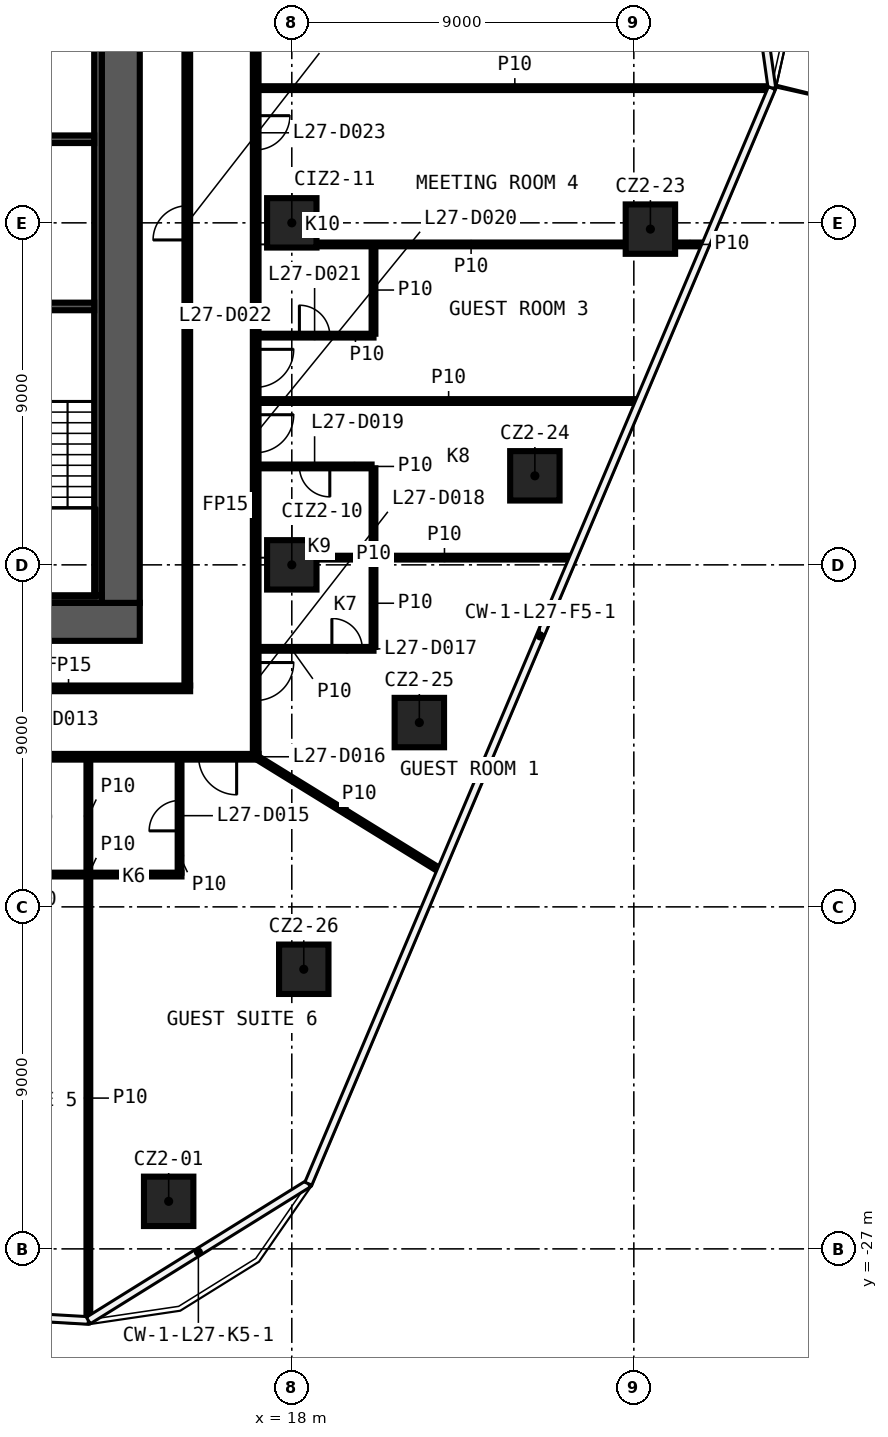
"""IFC4 building model, lengths in metres.
Left out: names, types, materials, properties, quantities, classifications, styles, units other than length and angle.
Written with IfcOpenShell. Run it as: python <this file> out.ifc"""

import sys

from ifc_helpers import new_model, si_unit, direction, frame, frame_2d, origin, origin_2d, place, context, subcontext, project, spatial, rectangle, extrude, element, fill, save


model = new_model("IFC4")
c1 = context("Model", 3, precision=1e-05, world=origin(), true_north=direction((0.0, 1.0)))
c2 = subcontext(c1, "Body", "Model", "MODEL_VIEW")
j1 = project(units=[si_unit("LENGTHUNIT", "METRE"), si_unit("PLANEANGLEUNIT", "RADIAN")], contexts=[c1])
p1 = place(None, origin())
s1 = spatial("IfcSite", under=j1, at=p1, CompositionType="ELEMENT")
p2 = place(p1, origin())
s2 = spatial("IfcBuilding", under=s1, at=p2, CompositionType="ELEMENT")
p3 = place(p2, frame((0.0, 0.0, 124.8)))
s3 = spatial("IfcBuildingStorey", under=s2, at=p3, CompositionType="ELEMENT", Elevation=124.8)
for number, where, z_axis, x_axis in (
    (1, (14.76, -25.749, 0.0), (0.0, 0.0, 1.0), (1.0, 0.0, 0.0)),
    (2, (27.436, -0.165, 0.0), (0.0, 0.0, 1.0), (1.0, 0.0, 0.0)),
    (3, (24.396, -6.657, 0.0), (0.0, 0.0, 1.0), (1.0, 0.0, 0.0)),
    (4, (21.356, -13.15, 0.0), (0.0, 0.0, 1.0), (1.0, 0.0, 0.0)),
    (5, (18.315, -19.642, 0.0), (0.0, 0.0, 1.0), (1.0, 0.0, 0.0)),
    (6, (18.0, -9.0, 0.0), (0.0, 0.0, 1.0), (1.0, 0.0, 0.0)),
    (7, (18.0, 0.0, 0.0), (0.0, 0.0, 1.0), (1.0, 0.0, 0.0)),
):
    element("IfcColumn", number, at=place(p3, frame(where, z_axis=z_axis, x_axis=x_axis)), inside=s3, PredefinedType="COLUMN", context=c2, shape_type="SweptSolid", body=[
        extrude(rectangle(XDim=1.3, YDim=1.3, at=origin_2d()), origin(), (0.0, 0.0, 1.0), 3.3),
    ])
p4 = place(p3, frame((10.197, -17.15, 0.0), z_axis=(0.0, 0.0, 1.0), x_axis=(1.0, 0.0, 0.0)))
e8 = element("IfcWall", 8, at=p4, inside=s3, PredefinedType="PARTITIONING", context=c2, shape_type="SweptSolid", body=[
    extrude(rectangle(XDim=4.9, YDim=0.1, at=frame_2d((2.45, 0.0))), origin(), (0.0, 0.0, 1.0), 3.3),
])
p5 = place(p3, frame((17.125, -14.05, 0.0), z_axis=(0.0, 0.0, 1.0), x_axis=(-1.0, 0.0, 0.0)))
e9 = element("IfcWall", 9, at=p5, inside=s3, PredefinedType="PARTITIONING", context=c2, shape_type="SweptSolid", body=[
    extrude(rectangle(XDim=34.25, YDim=0.15, at=frame_2d((17.125, 0.0))), origin(), (0.0, 0.0, 1.0), 3.3),
])
p6 = place(p5, frame((32.089, 0.0, 0.0)))
e10 = element("IfcOpeningElement", 10, at=p6, cuts=e9, PredefinedType="OPENING", context=c2, shape_type="SweptSolid", body=[
    extrude(rectangle(XDim=0.9, YDim=2.1, at=frame_2d((0.45, 1.05))), frame((0.0, 0.085, 0.0), z_axis=(0.0, -1.0, 0.0), x_axis=(1.0, 0.0, 0.0)), (0.0, 0.0, 1.0), 0.17),
])
p7 = place(p5, frame((25.666, 0.0, 0.0)))
e11 = element("IfcOpeningElement", 11, at=p7, cuts=e9, PredefinedType="OPENING", context=c2, shape_type="SweptSolid", body=[
    extrude(rectangle(XDim=1.0, YDim=2.1, at=frame_2d((0.5, 1.05))), frame((0.0, 0.085, 0.0), z_axis=(0.0, -1.0, 0.0), x_axis=(1.0, 0.0, 0.0)), (0.0, 0.0, 1.0), 0.17),
])
p8 = place(p5, frame((18.714, 0.0, 0.0)))
e12 = element("IfcOpeningElement", 12, at=p8, cuts=e9, PredefinedType="OPENING", context=c2, shape_type="SweptSolid", body=[
    extrude(rectangle(XDim=1.0, YDim=2.1, at=frame_2d((0.5, 1.05))), frame((0.0, 0.085, 0.0), z_axis=(0.0, -1.0, 0.0), x_axis=(1.0, 0.0, 0.0)), (0.0, 0.0, 1.0), 0.17),
])
p9 = place(p5, frame((16.558, 0.0, 0.0)))
e13 = element("IfcOpeningElement", 13, at=p9, cuts=e9, PredefinedType="OPENING", context=c2, shape_type="SweptSolid", body=[
    extrude(rectangle(XDim=1.0, YDim=2.1, at=frame_2d((0.5, 1.05))), frame((0.0, 0.085, 0.0), z_axis=(0.0, -1.0, 0.0), x_axis=(1.0, 0.0, 0.0)), (0.0, 0.0, 1.0), 0.17),
])
p10 = place(p5, frame((9.602, 0.0, 0.0)))
e14 = element("IfcOpeningElement", 14, at=p10, cuts=e9, PredefinedType="OPENING", context=c2, shape_type="SweptSolid", body=[
    extrude(rectangle(XDim=1.0, YDim=2.1, at=frame_2d((0.5, 1.05))), frame((0.0, 0.085, 0.0), z_axis=(0.0, -1.0, 0.0), x_axis=(1.0, 0.0, 0.0)), (0.0, 0.0, 1.0), 0.17),
])
p11 = place(p5, frame((7.451, 0.0, 0.0)))
e15 = element("IfcOpeningElement", 15, at=p11, cuts=e9, PredefinedType="OPENING", context=c2, shape_type="SweptSolid", body=[
    extrude(rectangle(XDim=1.0, YDim=2.1, at=frame_2d((0.5, 1.05))), frame((0.0, 0.085, 0.0), z_axis=(0.0, -1.0, 0.0), x_axis=(1.0, 0.0, 0.0)), (0.0, 0.0, 1.0), 0.17),
])
p12 = place(p5, frame((0.576, 0.0, 0.0)))
e16 = element("IfcOpeningElement", 16, at=p12, cuts=e9, PredefinedType="OPENING", context=c2, shape_type="SweptSolid", body=[
    extrude(rectangle(XDim=1.0, YDim=2.1, at=frame_2d((0.5, 1.05))), frame((0.0, 0.085, 0.0), z_axis=(0.0, -1.0, 0.0), x_axis=(1.0, 0.0, 0.0)), (0.0, 0.0, 1.0), 0.17),
])
p13 = place(p3, frame((8.925, -12.25, 0.0), z_axis=(0.0, 0.0, 1.0), x_axis=(1.0, 0.0, 0.0)))
e17 = element("IfcWall", 17, at=p13, inside=s3, PredefinedType="PARTITIONING", context=c2, shape_type="SweptSolid", body=[
    extrude(rectangle(XDim=6.4, YDim=0.15, at=frame_2d((3.2, 0.0))), origin(), (0.0, 0.0, 1.0), 3.3),
])
p14 = place(p3, frame((17.125, -11.21, 0.0), z_axis=(0.0, 0.0, 1.0), x_axis=(1.0, 0.0, 0.0)))
e18 = element("IfcWall", 18, at=p14, inside=s3, PredefinedType="PARTITIONING", context=c2, shape_type="SweptSolid", body=[
    extrude(rectangle(XDim=3.025, YDim=0.1, at=frame_2d((1.512, 0.0))), origin(), (0.0, 0.0, 1.0), 3.3),
])
p15 = place(p14, frame((1.93, 0.0, 0.0)))
e19 = element("IfcOpeningElement", 19, at=p15, cuts=e18, PredefinedType="OPENING", context=c2, shape_type="SweptSolid", body=[
    extrude(rectangle(XDim=0.8, YDim=2.1, at=frame_2d((0.4, 1.05))), frame((0.0, 0.06, 0.0), z_axis=(0.0, -1.0, 0.0), x_axis=(1.0, 0.0, 0.0)), (0.0, 0.0, 1.0), 0.12),
])
p16 = place(p3, frame((18.65, -8.81, 0.0), z_axis=(0.0, 0.0, 1.0), x_axis=(1.0, 0.0, 0.0)))
e20 = element("IfcWall", 20, at=p16, inside=s3, PredefinedType="PARTITIONING", context=c2, shape_type="SweptSolid", body=[
    extrude(rectangle(XDim=6.735, YDim=0.1, at=frame_2d((3.367, 0.0))), origin(), (0.0, 0.0, 1.0), 3.3),
])
p17 = place(p3, frame((20.1, -6.41, 0.0), z_axis=(0.0, 0.0, 1.0), x_axis=(-1.0, 0.0, 0.0)))
e21 = element("IfcWall", 21, at=p17, inside=s3, PredefinedType="PARTITIONING", context=c2, shape_type="SweptSolid", body=[
    extrude(rectangle(XDim=2.975, YDim=0.1, at=frame_2d((1.488, 0.0))), origin(), (0.0, 0.0, 1.0), 3.3),
])
p18 = place(p17, frame((1.1, 0.0, 0.0)))
e22 = element("IfcOpeningElement", 22, at=p18, cuts=e21, PredefinedType="OPENING", context=c2, shape_type="SweptSolid", body=[
    extrude(rectangle(XDim=0.8, YDim=2.1, at=frame_2d((0.4, 1.05))), frame((0.0, 0.06, 0.0), z_axis=(0.0, -1.0, 0.0), x_axis=(1.0, 0.0, 0.0)), (0.0, 0.0, 1.0), 0.12),
])
p19 = place(p3, frame((17.125, -4.689, 0.0), z_axis=(0.0, 0.0, 1.0), x_axis=(1.0, 0.0, 0.0)))
e23 = element("IfcWall", 23, at=p19, inside=s3, PredefinedType="PARTITIONING", context=c2, shape_type="SweptSolid", body=[
    extrude(rectangle(XDim=10.003, YDim=0.1, at=frame_2d((5.001, 0.0))), origin(), (0.0, 0.0, 1.0), 3.3),
])
p20 = place(p3, frame((17.125, -2.968, 0.0), z_axis=(0.0, 0.0, 1.0), x_axis=(1.0, 0.0, 0.0)))
e24 = element("IfcWall", 24, at=p20, inside=s3, PredefinedType="PARTITIONING", context=c2, shape_type="SweptSolid", body=[
    extrude(rectangle(XDim=3.025, YDim=0.1, at=frame_2d((1.512, 0.0))), origin(), (0.0, 0.0, 1.0), 3.3),
])
p21 = place(p20, frame((1.075, 0.0, 0.0)))
e25 = element("IfcOpeningElement", 25, at=p21, cuts=e24, PredefinedType="OPENING", context=c2, shape_type="SweptSolid", body=[
    extrude(rectangle(XDim=0.8, YDim=2.1, at=frame_2d((0.4, 1.05))), frame((0.0, 0.06, 0.0), z_axis=(0.0, -1.0, 0.0), x_axis=(1.0, 0.0, 0.0)), (0.0, 0.0, 1.0), 0.12),
])
p22 = place(p3, frame((18.65, -0.568, 0.0), z_axis=(0.0, 0.0, 1.0), x_axis=(1.0, 0.0, 0.0)))
e26 = element("IfcWall", 26, at=p22, inside=s3, PredefinedType="PARTITIONING", context=c2, shape_type="SweptSolid", body=[
    extrude(rectangle(XDim=8.136, YDim=0.1, at=frame_2d((4.068, 0.0))), origin(), (0.0, 0.0, 1.0), 3.3),
])
p23 = place(p3, frame((28.086, -0.568, 0.0), z_axis=(0.0, 0.0, 1.0), x_axis=(1.0, 0.0, 0.0)))
e27 = element("IfcWall", 27, at=p23, inside=s3, PredefinedType="PARTITIONING", context=c2, shape_type="SweptSolid", body=[
    extrude(rectangle(XDim=0.786, YDim=0.1, at=frame_2d((0.393, 0.0))), origin(), (0.0, 0.0, 1.0), 3.3),
])
p24 = place(p3, frame((17.125, 3.545, 0.0), z_axis=(0.0, 0.0, 1.0), x_axis=(1.0, 0.0, 0.0)))
e28 = element("IfcWall", 28, at=p24, inside=s3, PredefinedType="PARTITIONING", context=c2, shape_type="SweptSolid", body=[
    extrude(rectangle(XDim=13.487, YDim=0.1, at=frame_2d((6.743, 0.0))), origin(), (0.0, 0.0, 1.0), 3.3),
])
p25 = place(p3, frame((20.15, -11.16, 0.0), z_axis=(0.0, 0.0, 1.0), x_axis=(0.0, 1.0, 0.0)))
e29 = element("IfcWall", 29, at=p25, inside=s3, PredefinedType="PARTITIONING", context=c2, shape_type="SweptSolid", body=[
    extrude(rectangle(XDim=2.3, YDim=0.1, at=frame_2d((1.15, 0.0))), origin(), (0.0, 0.0, 1.0), 3.3),
])
p26 = place(p3, frame((20.15, -8.76, 0.0), z_axis=(0.0, 0.0, 1.0), x_axis=(0.0, 1.0, 0.0)))
e30 = element("IfcWall", 30, at=p26, inside=s3, PredefinedType="PARTITIONING", context=c2, shape_type="SweptSolid", body=[
    extrude(rectangle(XDim=2.3, YDim=0.1, at=frame_2d((1.15, 0.0))), origin(), (0.0, 0.0, 1.0), 3.3),
])
p27 = place(p3, frame((20.15, -2.918, 0.0), z_axis=(0.0, 0.0, 1.0), x_axis=(0.0, 1.0, 0.0)))
e31 = element("IfcWall", 31, at=p27, inside=s3, PredefinedType="PARTITIONING", context=c2, shape_type="SweptSolid", body=[
    extrude(rectangle(XDim=2.3, YDim=0.1, at=frame_2d((1.15, 0.0))), origin(), (0.0, 0.0, 1.0), 3.3),
])
p28 = place(p3, frame((17.05, 13.975, 0.0), z_axis=(0.0, 0.0, 1.0), x_axis=(0.0, -1.0, 0.0)))
e32 = element("IfcWall", 32, at=p28, inside=s3, PredefinedType="PARTITIONING", context=c2, shape_type="SweptSolid", body=[
    extrude(rectangle(XDim=27.95, YDim=0.15, at=frame_2d((13.975, 0.0))), origin(), (0.0, 0.0, 1.0), 3.3),
])
p29 = place(p28, frame((25.545, 0.0, 0.0)))
e33 = element("IfcOpeningElement", 33, at=p29, cuts=e32, PredefinedType="OPENING", context=c2, shape_type="SweptSolid", body=[
    extrude(rectangle(XDim=1.0, YDim=2.1, at=frame_2d((0.5, 1.05))), frame((0.0, 0.085, 0.0), z_axis=(0.0, -1.0, 0.0), x_axis=(1.0, 0.0, 0.0)), (0.0, 0.0, 1.0), 0.17),
])
p30 = place(p28, frame((19.024, 0.0, 0.0)))
e34 = element("IfcOpeningElement", 34, at=p30, cuts=e32, PredefinedType="OPENING", context=c2, shape_type="SweptSolid", body=[
    extrude(rectangle(XDim=1.0, YDim=2.1, at=frame_2d((0.5, 1.05))), frame((0.0, 0.085, 0.0), z_axis=(0.0, -1.0, 0.0), x_axis=(1.0, 0.0, 0.0)), (0.0, 0.0, 1.0), 0.17),
])
p31 = place(p28, frame((17.303, 0.0, 0.0)))
e35 = element("IfcOpeningElement", 35, at=p31, cuts=e32, PredefinedType="OPENING", context=c2, shape_type="SweptSolid", body=[
    extrude(rectangle(XDim=1.0, YDim=2.1, at=frame_2d((0.5, 1.05))), frame((0.0, 0.085, 0.0), z_axis=(0.0, -1.0, 0.0), x_axis=(1.0, 0.0, 0.0)), (0.0, 0.0, 1.0), 0.17),
])
p32 = place(p28, frame((11.155, 0.0, 0.0)))
e36 = element("IfcOpeningElement", 36, at=p32, cuts=e32, PredefinedType="OPENING", context=c2, shape_type="SweptSolid", body=[
    extrude(rectangle(XDim=0.9, YDim=2.1, at=frame_2d((0.45, 1.05))), frame((0.0, 0.085, 0.0), z_axis=(0.0, -1.0, 0.0), x_axis=(1.0, 0.0, 0.0)), (0.0, 0.0, 1.0), 0.17),
])
p33 = place(p28, frame((7.145, 0.0, 0.0)))
e37 = element("IfcOpeningElement", 37, at=p33, cuts=e32, PredefinedType="OPENING", context=c2, shape_type="SweptSolid", body=[
    extrude(rectangle(XDim=0.9, YDim=2.1, at=frame_2d((0.45, 1.05))), frame((0.0, 0.085, 0.0), z_axis=(0.0, -1.0, 0.0), x_axis=(1.0, 0.0, 0.0)), (0.0, 0.0, 1.0), 0.17),
])
p34 = place(p28, frame((2.168, 0.0, 0.0)))
e38 = element("IfcOpeningElement", 38, at=p34, cuts=e32, PredefinedType="OPENING", context=c2, shape_type="SweptSolid", body=[
    extrude(rectangle(XDim=0.9, YDim=2.1, at=frame_2d((0.45, 1.05))), frame((0.0, 0.085, 0.0), z_axis=(0.0, -1.0, 0.0), x_axis=(1.0, 0.0, 0.0)), (0.0, 0.0, 1.0), 0.17),
])
p35 = place(p3, frame((15.25, -12.175, 0.0), z_axis=(0.0, 0.0, 1.0), x_axis=(0.0, 1.0, 0.0)))
e39 = element("IfcWall", 39, at=p35, inside=s3, PredefinedType="PARTITIONING", context=c2, shape_type="SweptSolid", body=[
    extrude(rectangle(XDim=24.35, YDim=0.15, at=frame_2d((12.175, 0.0))), origin(), (0.0, 0.0, 1.0), 3.3),
])
p36 = place(p35, frame((11.725, 0.0, 0.0)))
e40 = element("IfcOpeningElement", 40, at=p36, cuts=e39, PredefinedType="OPENING", context=c2, shape_type="SweptSolid", body=[
    extrude(rectangle(XDim=0.9, YDim=2.1, at=frame_2d((0.45, 1.05))), frame((0.0, 0.085, 0.0), z_axis=(0.0, -1.0, 0.0), x_axis=(1.0, 0.0, 0.0)), (0.0, 0.0, 1.0), 0.17),
])
p37 = place(p3, frame((15.047, -17.1, 0.0), z_axis=(0.0, 0.0, 1.0), x_axis=(0.0, 1.0, 0.0)))
e41 = element("IfcWall", 41, at=p37, inside=s3, PredefinedType="PARTITIONING", context=c2, shape_type="SweptSolid", body=[
    extrude(rectangle(XDim=2.975, YDim=0.1, at=frame_2d((1.488, 0.0))), origin(), (0.0, 0.0, 1.0), 3.3),
])
p38 = place(p37, frame((1.1, 0.0, 0.0)))
e42 = element("IfcOpeningElement", 42, at=p38, cuts=e41, PredefinedType="OPENING", context=c2, shape_type="SweptSolid", body=[
    extrude(rectangle(XDim=0.8, YDim=2.1, at=frame_2d((0.4, 1.05))), frame((0.0, 0.06, 0.0), z_axis=(0.0, -1.0, 0.0), x_axis=(1.0, 0.0, 0.0)), (0.0, 0.0, 1.0), 0.12),
])
p39 = place(p3, frame((12.647, -28.864, 0.0), z_axis=(0.0, 0.0, 1.0), x_axis=(0.0, 1.0, 0.0)))
e43 = element("IfcWall", 43, at=p39, inside=s3, PredefinedType="PARTITIONING", context=c2, shape_type="SweptSolid", body=[
    extrude(rectangle(XDim=11.664, YDim=0.1, at=frame_2d((5.832, 0.0))), origin(), (0.0, 0.0, 1.0), 3.3),
])
p40 = place(p3, frame((12.647, -17.1, 0.0), z_axis=(0.0, 0.0, 1.0), x_axis=(0.0, 1.0, 0.0)))
e44 = element("IfcWall", 44, at=p40, inside=s3, PredefinedType="PARTITIONING", context=c2, shape_type="SweptSolid", body=[
    extrude(rectangle(XDim=2.975, YDim=0.1, at=frame_2d((1.488, 0.0))), origin(), (0.0, 0.0, 1.0), 3.3),
])
p41 = place(p3, frame((17.05, -14.05, 0.0), z_axis=(0.0, 0.0, 1.0), x_axis=(0.851278656023, -0.524713874221, 0.0)))
e45 = element("IfcWall", 45, at=p41, inside=s3, PredefinedType="PARTITIONING", context=c2, shape_type="SweptSolid", body=[
    extrude(rectangle(XDim=5.7, YDim=0.1, at=frame_2d((2.85, 0.0))), origin(), (0.0, 0.0, 1.0), 3.3),
])
p42 = place(p3, frame((14.0, -10.5, 0.0), z_axis=(0.0, 0.0, 1.0), x_axis=(-1.0, 0.0, 0.0)))
e46 = element("IfcWall", 46, at=p42, inside=s3, PredefinedType="SHEAR", context=c2, shape_type="SweptSolid", body=[
    extrude(rectangle(XDim=28.0, YDim=1.0, at=frame_2d((14.0, 0.0))), origin(), (0.0, 0.0, 1.0), 3.3),
])
p43 = place(p42, frame((5.1, 0.0, 0.0)))
e47 = element("IfcOpeningElement", 47, at=p43, cuts=e46, PredefinedType="OPENING", context=c2, shape_type="SweptSolid", body=[
    extrude(rectangle(XDim=1.6, YDim=2.1, at=frame_2d((0.8, 1.05))), frame((0.0, 0.51, 0.0), z_axis=(0.0, -1.0, 0.0), x_axis=(1.0, 0.0, 0.0)), (0.0, 0.0, 1.0), 1.02),
])
p44 = place(p3, frame((13.5, 10.0, 0.0), z_axis=(0.0, 0.0, 1.0), x_axis=(0.0, -1.0, 0.0)))
e48 = element("IfcWall", 48, at=p44, inside=s3, PredefinedType="SHEAR", context=c2, shape_type="SweptSolid", body=[
    extrude(rectangle(XDim=20.0, YDim=1.0, at=frame_2d((10.0, 0.0))), origin(), (0.0, 0.0, 1.0), 3.3),
])
p45 = place(p3, frame((13.0, -9.9, 0.0), z_axis=(0.0, 0.0, 1.0), x_axis=(-1.0, 0.0, 0.0)))
e49 = element("IfcWall", 49, at=p45, inside=s3, PredefinedType="SHEAR", context=c2, shape_type="SweptSolid", body=[
    extrude(rectangle(XDim=3.7, YDim=0.2, at=frame_2d((1.85, 0.0))), origin(), (0.0, 0.0, 1.0), 3.3),
])
p46 = place(p3, frame((12.9, 9.8, 0.0), z_axis=(0.0, 0.0, 1.0), x_axis=(0.0, -1.0, 0.0)))
e50 = element("IfcWall", 50, at=p46, inside=s3, PredefinedType="SHEAR", context=c2, shape_type="SweptSolid", body=[
    extrude(rectangle(XDim=19.6, YDim=0.2, at=frame_2d((9.8, 0.0))), origin(), (0.0, 0.0, 1.0), 3.3),
])
for number, where, z_axis, x_axis in (
    (51, (9.45, 2.2, 0.0), (0.0, 0.0, 1.0), (1.0, 0.0, 0.0)),
    (52, (9.45, -2.2, 0.0), (0.0, 0.0, 1.0), (1.0, 0.0, 0.0)),
):
    element("IfcWall", number, at=place(p3, frame(where, z_axis=z_axis, x_axis=x_axis)), inside=s3, PredefinedType="SHEAR", context=c2, shape_type="SweptSolid", body=[
        extrude(rectangle(XDim=3.35, YDim=0.2, at=frame_2d((1.675, 0.0))), origin(), (0.0, 0.0, 1.0), 3.3),
    ])
p47 = place(p38, origin())
e53 = element("IfcDoor", 53, at=p47, inside=s3, OperationType="SINGLE_SWING_LEFT", PredefinedType="DOOR", context=c2, shape_type="SweptSolid", body=[
    extrude(rectangle(XDim=0.8, YDim=2.1, at=frame_2d((0.4, 1.05))), frame((0.0, 0.025, 0.0), z_axis=(0.0, -1.0, 0.0), x_axis=(1.0, 0.0, 0.0)), (0.0, 0.0, 1.0), 0.05),
])
fill(e42, e53)
p48 = place(p12, origin())
e54 = element("IfcDoor", 54, at=p48, inside=s3, OperationType="SINGLE_SWING_RIGHT", PredefinedType="DOOR", context=c2, shape_type="SweptSolid", body=[
    extrude(rectangle(XDim=1.0, YDim=2.1, at=frame_2d((0.5, 1.05))), frame((0.0, 0.025, 0.0), z_axis=(0.0, -1.0, 0.0), x_axis=(1.0, 0.0, 0.0)), (0.0, 0.0, 1.0), 0.05),
])
fill(e16, e54)
p49 = place(p15, origin())
e55 = element("IfcDoor", 55, at=p49, inside=s3, OperationType="SINGLE_SWING_RIGHT", PredefinedType="DOOR", context=c2, shape_type="SweptSolid", body=[
    extrude(rectangle(XDim=0.8, YDim=2.1, at=frame_2d((0.4, 1.05))), frame((0.0, 0.025, 0.0), z_axis=(0.0, -1.0, 0.0), x_axis=(1.0, 0.0, 0.0)), (0.0, 0.0, 1.0), 0.05),
])
fill(e19, e55)
p50 = place(p29, origin())
e56 = element("IfcDoor", 56, at=p50, inside=s3, OperationType="SINGLE_SWING_LEFT", PredefinedType="DOOR", context=c2, shape_type="SweptSolid", body=[
    extrude(rectangle(XDim=1.0, YDim=2.1, at=frame_2d((0.5, 1.05))), frame((0.0, 0.025, 0.0), z_axis=(0.0, -1.0, 0.0), x_axis=(1.0, 0.0, 0.0)), (0.0, 0.0, 1.0), 0.05),
])
fill(e33, e56)
p51 = place(p18, origin())
e57 = element("IfcDoor", 57, at=p51, inside=s3, OperationType="SINGLE_SWING_LEFT", PredefinedType="DOOR", context=c2, shape_type="SweptSolid", body=[
    extrude(rectangle(XDim=0.8, YDim=2.1, at=frame_2d((0.4, 1.05))), frame((0.0, 0.025, 0.0), z_axis=(0.0, -1.0, 0.0), x_axis=(1.0, 0.0, 0.0)), (0.0, 0.0, 1.0), 0.05),
])
fill(e22, e57)
p52 = place(p30, origin())
e58 = element("IfcDoor", 58, at=p52, inside=s3, OperationType="SINGLE_SWING_RIGHT", PredefinedType="DOOR", context=c2, shape_type="SweptSolid", body=[
    extrude(rectangle(XDim=1.0, YDim=2.1, at=frame_2d((0.5, 1.05))), frame((0.0, 0.025, 0.0), z_axis=(0.0, -1.0, 0.0), x_axis=(1.0, 0.0, 0.0)), (0.0, 0.0, 1.0), 0.05),
])
fill(e34, e58)
p53 = place(p21, origin())
e59 = element("IfcDoor", 59, at=p53, inside=s3, OperationType="SINGLE_SWING_RIGHT", PredefinedType="DOOR", context=c2, shape_type="SweptSolid", body=[
    extrude(rectangle(XDim=0.8, YDim=2.1, at=frame_2d((0.4, 1.05))), frame((0.0, 0.025, 0.0), z_axis=(0.0, -1.0, 0.0), x_axis=(1.0, 0.0, 0.0)), (0.0, 0.0, 1.0), 0.05),
])
fill(e25, e59)
p54 = place(p31, origin())
e60 = element("IfcDoor", 60, at=p54, inside=s3, OperationType="SINGLE_SWING_LEFT", PredefinedType="DOOR", context=c2, shape_type="SweptSolid", body=[
    extrude(rectangle(XDim=1.0, YDim=2.1, at=frame_2d((0.5, 1.05))), frame((0.0, 0.025, 0.0), z_axis=(0.0, -1.0, 0.0), x_axis=(1.0, 0.0, 0.0)), (0.0, 0.0, 1.0), 0.05),
])
fill(e35, e60)
p55 = place(p32, origin())
e61 = element("IfcDoor", 61, at=p55, inside=s3, OperationType="SINGLE_SWING_RIGHT", PredefinedType="DOOR", context=c2, shape_type="SweptSolid", body=[
    extrude(rectangle(XDim=0.9, YDim=2.1, at=frame_2d((0.45, 1.05))), frame((0.0, 0.025, 0.0), z_axis=(0.0, -1.0, 0.0), x_axis=(1.0, 0.0, 0.0)), (0.0, 0.0, 1.0), 0.05),
])
fill(e36, e61)
p56 = place(p36, origin())
e62 = element("IfcDoor", 62, at=p56, inside=s3, OperationType="SINGLE_SWING_RIGHT", PredefinedType="DOOR", context=c2, shape_type="SweptSolid", body=[
    extrude(rectangle(XDim=0.9, YDim=2.1, at=frame_2d((0.45, 1.05))), frame((0.0, 0.025, 0.0), z_axis=(0.0, -1.0, 0.0), x_axis=(1.0, 0.0, 0.0)), (0.0, 0.0, 1.0), 0.05),
])
fill(e40, e62)
save(model, sys.argv[1])
